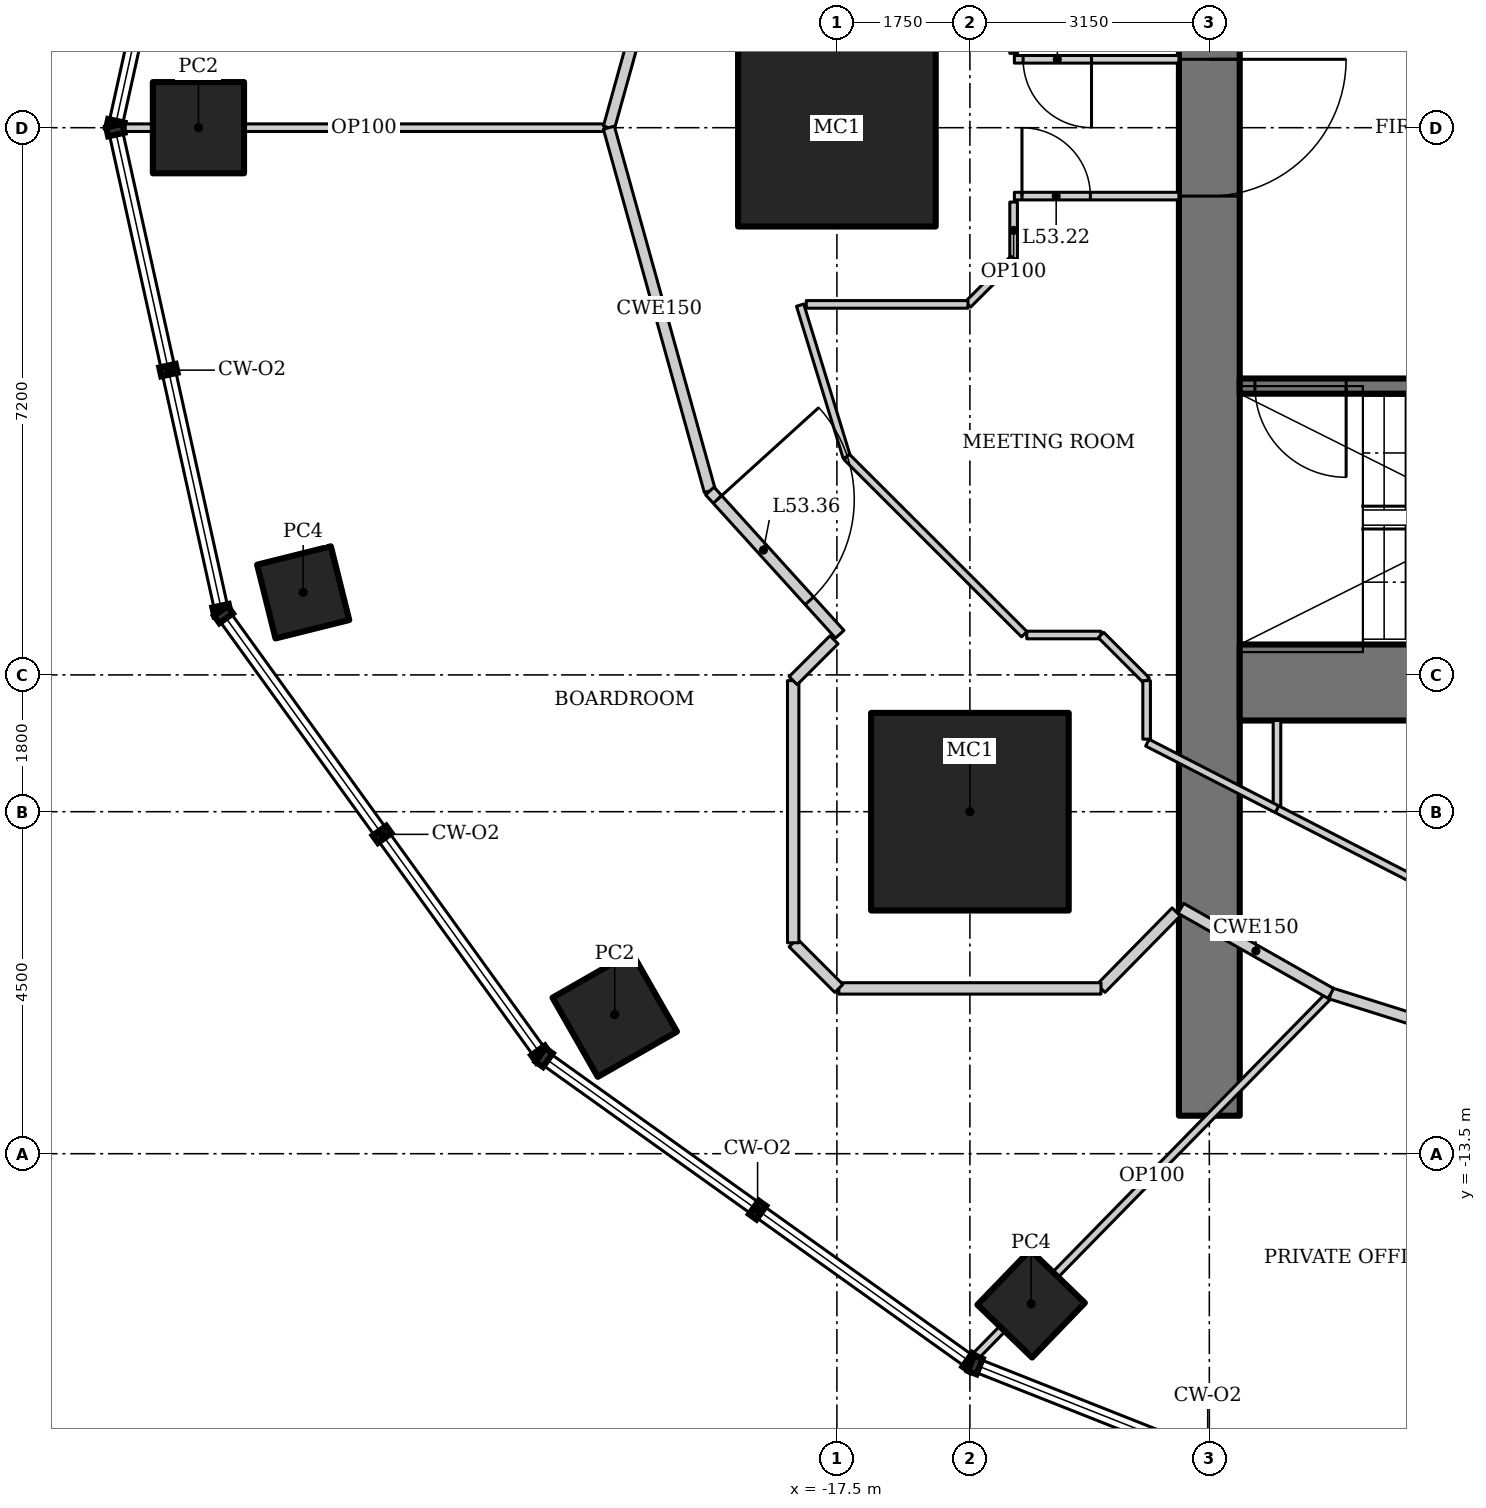
"""IFC4 building model, lengths in metres.
Left out: names, types, materials, properties, quantities, classifications, styles, units other than length and angle.
Written with IfcOpenShell. Run it as: python <this file> out.ifc"""

import sys

from ifc_helpers import new_model, si_unit, direction, frame, frame_2d, origin, origin_2d, place, context, subcontext, project, spatial, rectangle, hollow_rectangle, extrude, element, fill, save


model = new_model("IFC4")
c1 = context("Model", 3, precision=1e-05, world=origin(), true_north=direction((0.0, 1.0)))
c2 = subcontext(c1, "Body", "Model", "MODEL_VIEW")
j1 = project(units=[si_unit("LENGTHUNIT", "METRE"), si_unit("PLANEANGLEUNIT", "RADIAN")], contexts=[c1])
p1 = place(None, origin())
s1 = spatial("IfcSite", under=j1, at=p1, CompositionType="ELEMENT")
p2 = place(p1, origin())
s2 = spatial("IfcBuilding", under=s1, at=p2, CompositionType="ELEMENT")
p3 = place(p2, frame((0.0, 0.0, 228.4)))
s3 = spatial("IfcBuildingStorey", under=s2, at=p3, CompositionType="ELEMENT", Elevation=228.4)
for number, where, z_axis, x_axis in (
    (1, (-17.5, 0.0, 0.0), (0.0, 0.0, 1.0), (1.0, 0.0, 0.0)),
    (2, (-15.75, -9.0, 0.0), (0.0, 0.0, 1.0), (1.0, 0.0, 0.0)),
):
    element("IfcColumn", number, at=place(p3, frame(where, z_axis=z_axis, x_axis=x_axis)), inside=s3, PredefinedType="COLUMN", context=c2, shape_type="SweptSolid", body=[
        extrude(hollow_rectangle(XDim=2.6, YDim=2.6, WallThickness=0.13, at=origin_2d()), origin(), (0.0, 0.0, 1.0), 4.2),
    ])
p4 = place(p3, frame((-25.9, 0.0, 0.0), z_axis=(0.0, 0.0, 1.0), x_axis=(1.0, 0.0, 0.0)))
e3 = element("IfcColumn", 3, at=p4, inside=s3, PredefinedType="COLUMN", context=c2, shape_type="SweptSolid", body=[
    extrude(hollow_rectangle(XDim=1.2, YDim=1.2, WallThickness=0.1, at=origin_2d()), origin(), (0.0, 0.0, 1.0), 4.2),
])
p5 = place(p3, frame((-24.522, -6.114, 0.0), z_axis=(0.0, 0.0, 1.0), x_axis=(0.970295726276, 0.2419218956, 0.0)))
e4 = element("IfcColumn", 4, at=p5, inside=s3, PredefinedType="COLUMN", context=c2, shape_type="SweptSolid", body=[
    extrude(hollow_rectangle(XDim=1.0, YDim=1.0, WallThickness=0.08, at=origin_2d()), origin(), (0.0, 0.0, 1.0), 4.2),
])
p6 = place(p3, frame((-20.423, -11.67, 0.0), z_axis=(0.0, 0.0, 1.0), x_axis=(0.86824298017, 0.496139221777, 0.0)))
e5 = element("IfcColumn", 5, at=p6, inside=s3, PredefinedType="COLUMN", context=c2, shape_type="SweptSolid", body=[
    extrude(hollow_rectangle(XDim=1.2, YDim=1.2, WallThickness=0.1, at=origin_2d()), origin(), (0.0, 0.0, 1.0), 4.2),
])
p7 = place(p3, frame((-14.944, -15.475, 0.0), z_axis=(0.0, 0.0, 1.0), x_axis=(0.694658370459, 0.719339800339, 0.0)))
e6 = element("IfcColumn", 6, at=p7, inside=s3, PredefinedType="COLUMN", context=c2, shape_type="SweptSolid", body=[
    extrude(hollow_rectangle(XDim=1.0, YDim=1.0, WallThickness=0.08, at=origin_2d()), origin(), (0.0, 0.0, 1.0), 4.2),
])
p8 = place(p3, frame((-12.6, 13.0, 0.0), z_axis=(0.0, 0.0, 1.0), x_axis=(0.0, -1.0, 0.0)))
e7 = element("IfcWall", 7, at=p8, inside=s3, PredefinedType="SHEAR", context=c2, shape_type="SweptSolid", body=[
    extrude(rectangle(XDim=26.0, YDim=0.8, at=frame_2d((13.0, 0.0))), origin(), (0.0, 0.0, 1.0), 4.2),
])
p9 = place(p8, frame((12.1, 0.0, 0.0)))
e8 = element("IfcOpeningElement", 8, at=p9, cuts=e7, PredefinedType="OPENING", context=c2, shape_type="SweptSolid", body=[
    extrude(rectangle(XDim=1.8, YDim=2.1, at=frame_2d((0.9, 1.05))), frame((0.0, 0.41, 0.0), z_axis=(0.0, -1.0, 0.0), x_axis=(1.0, 0.0, 0.0)), (0.0, 0.0, 1.0), 0.82),
])
p10 = place(p3, frame((-12.2, -7.3, 0.0), z_axis=(0.0, 0.0, 1.0), x_axis=(1.0, 0.0, 0.0)))
e9 = element("IfcWall", 9, at=p10, inside=s3, PredefinedType="SHEAR", context=c2, shape_type="SweptSolid", body=[
    extrude(rectangle(XDim=24.4, YDim=1.0, at=frame_2d((12.2, 0.0))), origin(), (0.0, 0.0, 1.0), 4.2),
])
p11 = place(p3, frame((-5.6, -3.4, 0.0), z_axis=(0.0, 0.0, 1.0), x_axis=(-1.0, 0.0, 0.0)))
e10 = element("IfcWall", 10, at=p11, inside=s3, PredefinedType="SHEAR", context=c2, shape_type="SweptSolid", body=[
    extrude(rectangle(XDim=6.6, YDim=0.2, at=frame_2d((3.3, 0.0))), origin(), (0.0, 0.0, 1.0), 4.2),
])
p12 = place(p11, frame((5.2, 0.0, 0.0)))
e11 = element("IfcOpeningElement", 11, at=p12, cuts=e10, PredefinedType="OPENING", context=c2, shape_type="SweptSolid", body=[
    extrude(rectangle(XDim=1.2, YDim=2.1, at=frame_2d((0.6, 1.05))), frame((0.0, 0.11, 0.0), z_axis=(0.0, -1.0, 0.0), x_axis=(1.0, 0.0, 0.0)), (0.0, 0.0, 1.0), 0.22),
])
p13 = place(p3, frame((-26.944, 0.0, 0.0), z_axis=(0.0, 0.0, 1.0), x_axis=(1.0, 0.0, 0.0)))
e12 = element("IfcWall", 12, at=p13, inside=s3, PredefinedType="PARTITIONING", context=c2, shape_type="SweptSolid", body=[
    extrude(rectangle(XDim=6.444, YDim=0.1, at=frame_2d((3.222, 0.0))), origin(), (0.0, 0.0, 1.0), 3.349),
])
p14 = place(p3, frame((-15.709, -16.199, 0.0), z_axis=(0.0, 0.0, 1.0), x_axis=(0.699758297028, 0.71437967898, 0.0)))
e13 = element("IfcWall", 13, at=p14, inside=s3, PredefinedType="PARTITIONING", context=c2, shape_type="SweptSolid", body=[
    extrude(rectangle(XDim=6.729, YDim=0.1, at=frame_2d((3.365, 0.0))), origin(), (0.0, 0.0, 1.0), 3.41),
])
for number, where, z_axis, x_axis in (
    (14, (-19.172, 4.78, 0.0), (0.0, 0.0, 1.0), (-0.268, -0.964, 0.0)),
    (15, (-20.5, 0.0, 0.0), (0.0, 0.0, 1.0), (0.268, -0.964, 0.0)),
):
    element("IfcWall", number, at=place(p3, frame(where, z_axis=z_axis, x_axis=x_axis)), inside=s3, PredefinedType="PARTITIONING", context=c2, shape_type="SweptSolid", body=[
        extrude(rectangle(XDim=4.961, YDim=0.15, at=frame_2d((2.48, 0.0))), origin(), (0.0, 0.0, 1.0), 4.05),
    ])
p15 = place(p3, frame((-11.001, -11.392, 0.0), z_axis=(0.0, 0.0, 1.0), x_axis=(0.954031103669, -0.299707612903, 0.0)))
e16 = element("IfcWall", 16, at=p15, inside=s3, PredefinedType="PARTITIONING", context=c2, shape_type="SweptSolid", body=[
    extrude(rectangle(XDim=4.695, YDim=0.15, at=frame_2d((2.348, 0.0))), origin(), (0.0, 0.0, 1.0), 4.05),
])
p16 = place(p15, frame((2.0, 0.0, 0.0)))
e17 = element("IfcOpeningElement", 17, at=p16, cuts=e16, PredefinedType="OPENING", context=c2, shape_type="SweptSolid", body=[
    extrude(rectangle(XDim=0.9, YDim=2.1, at=frame_2d((0.45, 1.05))), frame((0.0, 0.085, 0.0), z_axis=(0.0, -1.0, 0.0), x_axis=(1.0, 0.0, 0.0)), (0.0, 0.0, 1.0), 0.17),
])
p17 = place(p3, frame((-11.71, -7.8, 0.0), z_axis=(0.0, 0.0, 1.0), x_axis=(0.0, -1.0, 0.0)))
e18 = element("IfcWall", 18, at=p17, inside=s3, PredefinedType="PARTITIONING", context=c2, shape_type="SweptSolid", body=[
    extrude(rectangle(XDim=1.167, YDim=0.1, at=frame_2d((0.583, 0.0))), origin(), (0.0, 0.0, 1.0), 4.05),
])
p18 = place(p3, frame((-9.67, -10.014, 0.0), z_axis=(0.0, 0.0, 1.0), x_axis=(-0.889605609385, 0.456729525814, 0.0)))
e19 = element("IfcWall", 19, at=p18, inside=s3, PredefinedType="PARTITIONING", context=c2, shape_type="SweptSolid", body=[
    extrude(rectangle(XDim=2.293, YDim=0.1, at=frame_2d((1.146, 0.0))), origin(), (0.0, 0.0, 1.0), 4.05),
])
p19 = place(p3, frame((-17.372, -4.331, 0.0), z_axis=(0.0, 0.0, 1.0), x_axis=(-0.293231279211, 0.956041535129, 0.0)))
e20 = element("IfcWall", 20, at=p19, inside=s3, PredefinedType="PARTITIONING", context=c2, shape_type="SweptSolid", body=[
    extrude(rectangle(XDim=2.088, YDim=0.1, at=frame_2d((1.044, 0.0))), origin(), (0.0, 0.0, 1.0), 4.05),
])
p20 = place(p3, frame((-15.165, -0.9, 0.0), z_axis=(0.0, 0.0, 1.0), x_axis=(1.0, 0.0, 0.0)))
e21 = element("IfcWall", 21, at=p20, inside=s3, PredefinedType="PARTITIONING", context=c2, shape_type="SweptSolid", body=[
    extrude(rectangle(XDim=2.165, YDim=0.1, at=frame_2d((1.083, 0.0))), origin(), (0.0, 0.0, 1.0), 4.05),
])
p21 = place(p20, frame((0.1, 0.0, 0.0)))
e22 = element("IfcOpeningElement", 22, at=p21, cuts=e21, PredefinedType="OPENING", context=c2, shape_type="SweptSolid", body=[
    extrude(rectangle(XDim=0.9, YDim=2.1, at=frame_2d((0.45, 1.05))), frame((0.0, 0.06, 0.0), z_axis=(0.0, -1.0, 0.0), x_axis=(1.0, 0.0, 0.0)), (0.0, 0.0, 1.0), 0.12),
])
p22 = place(p3, frame((-13.0, 0.9, 0.0), z_axis=(0.0, 0.0, 1.0), x_axis=(-1.0, 0.0, 0.0)))
e23 = element("IfcWall", 23, at=p22, inside=s3, PredefinedType="PARTITIONING", context=c2, shape_type="SweptSolid", body=[
    extrude(rectangle(XDim=2.165, YDim=0.1, at=frame_2d((1.083, 0.0))), origin(), (0.0, 0.0, 1.0), 4.05),
])
p23 = place(p22, frame((1.15, 0.0, 0.0)))
e24 = element("IfcOpeningElement", 24, at=p23, cuts=e23, PredefinedType="OPENING", context=c2, shape_type="SweptSolid", body=[
    extrude(rectangle(XDim=0.9, YDim=2.1, at=frame_2d((0.45, 1.05))), frame((0.0, 0.06, 0.0), z_axis=(0.0, -1.0, 0.0), x_axis=(1.0, 0.0, 0.0)), (0.0, 0.0, 1.0), 0.12),
])
p24 = place(p3, frame((-15.175, -0.978, 0.0), z_axis=(0.0, 0.0, 1.0), x_axis=(0.0, -1.0, 0.0)))
e25 = element("IfcWall", 25, at=p24, inside=s3, PredefinedType="PARTITIONING", context=c2, shape_type="SweptSolid", body=[
    extrude(rectangle(XDim=0.746, YDim=0.1, at=frame_2d((0.373, 0.0))), origin(), (0.0, 0.0, 1.0), 4.05),
])
p25 = place(p3, frame((-15.175, -1.725, 0.0), z_axis=(0.0, 0.0, 1.0), x_axis=(-0.707106781187, -0.707106781187, 0.0)))
e26 = element("IfcWall", 26, at=p25, inside=s3, PredefinedType="PARTITIONING", context=c2, shape_type="SweptSolid", body=[
    extrude(rectangle(XDim=0.849, YDim=0.1, at=frame_2d((0.425, 0.0))), origin(), (0.0, 0.0, 1.0), 4.05),
])
p26 = place(p3, frame((-15.775, -2.325, 0.0), z_axis=(0.0, 0.0, 1.0), x_axis=(-1.0, 0.0, 0.0)))
e27 = element("IfcWall", 27, at=p26, inside=s3, PredefinedType="PARTITIONING", context=c2, shape_type="SweptSolid", body=[
    extrude(rectangle(XDim=2.128, YDim=0.1, at=frame_2d((1.064, 0.0))), origin(), (0.0, 0.0, 1.0), 4.05),
])
p27 = place(p3, frame((-15.175, 1.725, 0.0), z_axis=(0.0, 0.0, 1.0), x_axis=(0.0, -1.0, 0.0)))
e28 = element("IfcWall", 28, at=p27, inside=s3, PredefinedType="PARTITIONING", context=c2, shape_type="SweptSolid", body=[
    extrude(rectangle(XDim=0.746, YDim=0.1, at=frame_2d((0.373, 0.0))), origin(), (0.0, 0.0, 1.0), 4.05),
])
p28 = place(p3, frame((-19.172, -4.78, 0.0), z_axis=(0.0, 0.0, 1.0), x_axis=(0.671721890643, -0.74080341632, 0.0)))
e29 = element("IfcWall", 29, at=p28, inside=s3, PredefinedType="PARTITIONING", context=c2, shape_type="SweptSolid", body=[
    extrude(rectangle(XDim=2.544, YDim=0.15, at=frame_2d((1.272, 0.0))), origin(), (0.0, 0.0, 1.0), 4.05),
])
p29 = place(p28, frame((0.15, 0.0, 0.0)))
e30 = element("IfcOpeningElement", 30, at=p29, cuts=e29, PredefinedType="OPENING", context=c2, shape_type="SweptSolid", body=[
    extrude(rectangle(XDim=1.8, YDim=2.1, at=frame_2d((0.9, 1.05))), frame((0.0, 0.085, 0.0), z_axis=(0.0, -1.0, 0.0), x_axis=(1.0, 0.0, 0.0)), (0.0, 0.0, 1.0), 0.17),
])
p30 = place(p3, frame((-12.975, -10.271, 0.0), z_axis=(0.0, 0.0, 1.0), x_axis=(0.869722107117, -0.493541747366, 0.0)))
e31 = element("IfcWall", 31, at=p30, inside=s3, PredefinedType="PARTITIONING", context=c2, shape_type="SweptSolid", body=[
    extrude(rectangle(XDim=2.27, YDim=0.15, at=frame_2d((1.135, 0.0))), origin(), (0.0, 0.0, 1.0), 4.05),
])
p31 = place(p3, frame((-11.71, -8.967, 0.0), z_axis=(0.0, 0.0, 1.0), x_axis=(-0.889638356137, 0.456665736935, 0.0)))
e32 = element("IfcWall", 32, at=p31, inside=s3, PredefinedType="PARTITIONING", context=c2, shape_type="SweptSolid", body=[
    extrude(rectangle(XDim=1.917, YDim=0.1, at=frame_2d((0.958, 0.0))), origin(), (0.0, 0.0, 1.0), 4.05),
])
p32 = place(p3, frame((-15.035, -6.665, 0.0), z_axis=(0.0, 0.0, 1.0), x_axis=(-0.707587114823, 0.70662612104, 0.0)))
e33 = element("IfcWall", 33, at=p32, inside=s3, PredefinedType="PARTITIONING", context=c2, shape_type="SweptSolid", body=[
    extrude(rectangle(XDim=3.303, YDim=0.1, at=frame_2d((1.651, 0.0))), origin(), (0.0, 0.0, 1.0), 4.05),
])
p33 = place(p3, frame((-15.002, -6.675, 0.0), z_axis=(0.0, 0.0, 1.0), x_axis=(1.0, 0.0, 0.0)))
e34 = element("IfcWall", 34, at=p33, inside=s3, PredefinedType="PARTITIONING", context=c2, shape_type="SweptSolid", body=[
    extrude(rectangle(XDim=0.977, YDim=0.1, at=frame_2d((0.488, 0.0))), origin(), (0.0, 0.0, 1.0), 4.05),
])
p34 = place(p3, frame((-14.025, -6.675, 0.0), z_axis=(0.0, 0.0, 1.0), x_axis=(0.707106781187, -0.707106781187, 0.0)))
e35 = element("IfcWall", 35, at=p34, inside=s3, PredefinedType="PARTITIONING", context=c2, shape_type="SweptSolid", body=[
    extrude(rectangle(XDim=0.849, YDim=0.1, at=frame_2d((0.425, 0.0))), origin(), (0.0, 0.0, 1.0), 4.05),
])
p35 = place(p3, frame((-13.425, -7.275, 0.0), z_axis=(0.0, 0.0, 1.0), x_axis=(0.0, -1.0, 0.0)))
e36 = element("IfcWall", 36, at=p35, inside=s3, PredefinedType="PARTITIONING", context=c2, shape_type="SweptSolid", body=[
    extrude(rectangle(XDim=0.77, YDim=0.1, at=frame_2d((0.385, 0.0))), origin(), (0.0, 0.0, 1.0), 4.05),
])
p36 = place(p3, frame((-13.036, -10.319, 0.0), z_axis=(0.0, 0.0, 1.0), x_axis=(-0.701113567316, -0.713049623606, 0.0)))
e37 = element("IfcWall", 37, at=p36, inside=s3, PredefinedType="PARTITIONING", context=c2, shape_type="SweptSolid", body=[
    extrude(rectangle(XDim=1.411, YDim=0.15, at=frame_2d((0.706, 0.0))), origin(), (0.0, 0.0, 1.0), 4.05),
])
p37 = place(p3, frame((-14.025, -11.325, 0.0), z_axis=(0.0, 0.0, 1.0), x_axis=(-1.0, 0.0, 0.0)))
e38 = element("IfcWall", 38, at=p37, inside=s3, PredefinedType="PARTITIONING", context=c2, shape_type="SweptSolid", body=[
    extrude(rectangle(XDim=3.449, YDim=0.15, at=frame_2d((1.725, 0.0))), origin(), (0.0, 0.0, 1.0), 4.05),
])
p38 = place(p3, frame((-17.475, -11.325, 0.0), z_axis=(0.0, 0.0, 1.0), x_axis=(-0.707106781187, 0.707106781187, 0.0)))
e39 = element("IfcWall", 39, at=p38, inside=s3, PredefinedType="PARTITIONING", context=c2, shape_type="SweptSolid", body=[
    extrude(rectangle(XDim=0.849, YDim=0.15, at=frame_2d((0.425, 0.0))), origin(), (0.0, 0.0, 1.0), 4.05),
])
p39 = place(p3, frame((-18.075, -10.725, 0.0), z_axis=(0.0, 0.0, 1.0), x_axis=(0.0, 1.0, 0.0)))
e40 = element("IfcWall", 40, at=p39, inside=s3, PredefinedType="PARTITIONING", context=c2, shape_type="SweptSolid", body=[
    extrude(rectangle(XDim=3.449, YDim=0.15, at=frame_2d((1.725, 0.0))), origin(), (0.0, 0.0, 1.0), 3.601),
])
p40 = place(p3, frame((-18.075, -7.275, 0.0), z_axis=(0.0, 0.0, 1.0), x_axis=(0.707106781187, 0.707106781187, 0.0)))
e41 = element("IfcWall", 41, at=p40, inside=s3, PredefinedType="PARTITIONING", context=c2, shape_type="SweptSolid", body=[
    extrude(rectangle(XDim=0.76, YDim=0.15, at=frame_2d((0.38, 0.0))), origin(), (0.0, 0.0, 1.0), 4.05),
])
p41 = place(p12, origin())
e42 = element("IfcDoor", 42, at=p41, inside=s3, OperationType="SINGLE_SWING_RIGHT", PredefinedType="DOOR", context=c2, shape_type="SweptSolid", body=[
    extrude(rectangle(XDim=1.2, YDim=2.1, at=frame_2d((0.6, 1.05))), frame((0.0, 0.025, 0.0), z_axis=(0.0, -1.0, 0.0), x_axis=(1.0, 0.0, 0.0)), (0.0, 0.0, 1.0), 0.05),
])
fill(e11, e42)
p42 = place(p9, origin())
e43 = element("IfcDoor", 43, at=p42, inside=s3, OperationType="DOUBLE_DOOR_DOUBLE_SWING", PredefinedType="DOOR", context=c2, shape_type="SweptSolid", body=[
    extrude(rectangle(XDim=1.8, YDim=2.1, at=frame_2d((0.9, 1.05))), frame((0.0, 0.025, 0.0), z_axis=(0.0, -1.0, 0.0), x_axis=(1.0, 0.0, 0.0)), (0.0, 0.0, 1.0), 0.05),
])
fill(e8, e43)
p43 = place(p21, origin())
e44 = element("IfcDoor", 44, at=p43, inside=s3, OperationType="SINGLE_SWING_LEFT", PredefinedType="DOOR", context=c2, shape_type="SweptSolid", body=[
    extrude(rectangle(XDim=0.9, YDim=2.1, at=frame_2d((0.45, 1.05))), frame((0.0, 0.025, 0.0), z_axis=(0.0, -1.0, 0.0), x_axis=(1.0, 0.0, 0.0)), (0.0, 0.0, 1.0), 0.05),
])
fill(e22, e44)
p44 = place(p23, origin())
e45 = element("IfcDoor", 45, at=p44, inside=s3, OperationType="SINGLE_SWING_LEFT", PredefinedType="DOOR", context=c2, shape_type="SweptSolid", body=[
    extrude(rectangle(XDim=0.9, YDim=2.1, at=frame_2d((0.45, 1.05))), frame((0.0, 0.025, 0.0), z_axis=(0.0, -1.0, 0.0), x_axis=(1.0, 0.0, 0.0)), (0.0, 0.0, 1.0), 0.05),
])
fill(e24, e45)
p45 = place(p29, origin())
e46 = element("IfcDoor", 46, at=p45, inside=s3, OperationType="DOUBLE_DOOR_DOUBLE_SWING", PredefinedType="DOOR", context=c2, shape_type="SweptSolid", body=[
    extrude(rectangle(XDim=1.8, YDim=2.1, at=frame_2d((0.9, 1.05))), frame((0.0, 0.025, 0.0), z_axis=(0.0, -1.0, 0.0), x_axis=(1.0, 0.0, 0.0)), (0.0, 0.0, 1.0), 0.05),
])
fill(e30, e46)
save(model, sys.argv[1])
